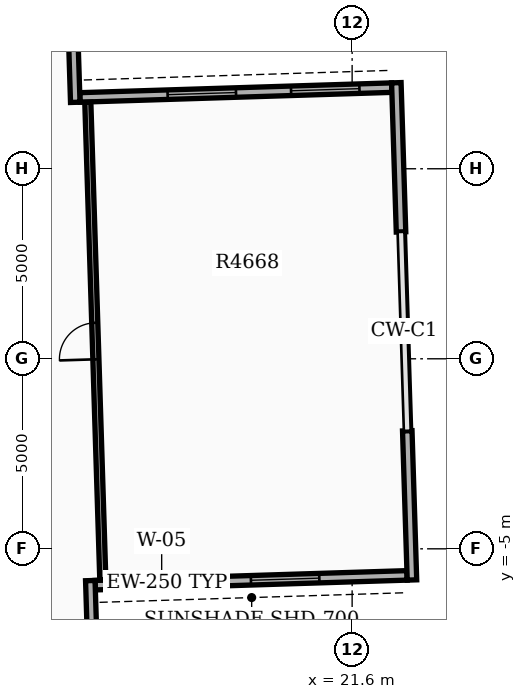
"""IFC4 building model, lengths in metres.
Left out: names, types, materials, properties, quantities, classifications, styles, units other than length and angle.
Written with IfcOpenShell. Run it as: python <this file> out.ifc"""

import sys

from ifc_helpers import new_model, si_unit, direction, frame, frame_2d, origin, place, context, subcontext, project, spatial, rectangle, extrude, element, fill, save


model = new_model("IFC4")
c1 = context("Model", 3, precision=1e-05, world=origin(), true_north=direction((0.0, 1.0)))
c2 = subcontext(c1, "Body", "Model", "MODEL_VIEW")
j1 = project(units=[si_unit("LENGTHUNIT", "METRE"), si_unit("PLANEANGLEUNIT", "RADIAN")], contexts=[c1])
p1 = place(None, origin())
s1 = spatial("IfcSite", under=j1, at=p1, CompositionType="ELEMENT")
p2 = place(p1, origin())
s2 = spatial("IfcBuilding", under=s1, at=p2, CompositionType="ELEMENT")
p3 = place(p2, frame((0.0, 0.0, 299.4)))
s3 = spatial("IfcBuildingStorey", under=s2, at=p3, CompositionType="ELEMENT", Elevation=299.4)
p4 = place(p3, frame((14.839, -5.957, 0.0), z_axis=(0.0, 0.0, 1.0), x_axis=(0.99950684008, 0.031401857168, 0.0)))
e1 = element("IfcWall", 1, at=p4, inside=s3, PredefinedType="STANDARD", context=c2, shape_type="SweptSolid", body=[
    extrude(rectangle(XDim=8.21, YDim=0.25, at=frame_2d((4.105, 0.0))), origin(), (0.0, 0.0, 1.0), 3.73),
])
p5 = place(p4, frame((0.85, 0.0, 0.8)))
e2 = element("IfcOpeningElement", 2, at=p5, cuts=e1, PredefinedType="OPENING", context=c2, shape_type="SweptSolid", body=[
    extrude(rectangle(XDim=1.8, YDim=1.8, at=frame_2d((0.9, 0.9))), frame((0.0, 0.135, 0.0), z_axis=(0.0, -1.0, 0.0), x_axis=(1.0, 0.0, 0.0)), (0.0, 0.0, 1.0), 0.27),
])
p6 = place(p4, frame((4.1, 0.0, 0.8)))
e3 = element("IfcOpeningElement", 3, at=p6, cuts=e1, PredefinedType="OPENING", context=c2, shape_type="SweptSolid", body=[
    extrude(rectangle(XDim=1.8, YDim=1.8, at=frame_2d((0.9, 0.9))), frame((0.0, 0.135, 0.0), z_axis=(0.0, -1.0, 0.0), x_axis=(1.0, 0.0, 0.0)), (0.0, 0.0, 1.0), 0.27),
])
p7 = place(p3, frame((22.642, 7.135, 0.0), z_axis=(0.0, 0.0, 1.0), x_axis=(-0.999505906315, -0.031431564411, 0.0)))
e4 = element("IfcWall", 4, at=p7, inside=s3, PredefinedType="STANDARD", context=c2, shape_type="SweptSolid", body=[
    extrude(rectangle(XDim=8.21, YDim=0.25, at=frame_2d((4.105, 0.0))), origin(), (0.0, 0.0, 1.0), 3.73),
])
p8 = place(p7, frame((0.85, 0.0, 0.8)))
e5 = element("IfcOpeningElement", 5, at=p8, cuts=e4, PredefinedType="OPENING", context=c2, shape_type="SweptSolid", body=[
    extrude(rectangle(XDim=1.8, YDim=1.8, at=frame_2d((0.9, 0.9))), frame((0.0, 0.135, 0.0), z_axis=(0.0, -1.0, 0.0), x_axis=(1.0, 0.0, 0.0)), (0.0, 0.0, 1.0), 0.27),
])
p9 = place(p7, frame((4.1, 0.0, 0.8)))
e6 = element("IfcOpeningElement", 6, at=p9, cuts=e4, PredefinedType="OPENING", context=c2, shape_type="SweptSolid", body=[
    extrude(rectangle(XDim=1.8, YDim=1.8, at=frame_2d((0.9, 0.9))), frame((0.0, 0.135, 0.0), z_axis=(0.0, -1.0, 0.0), x_axis=(1.0, 0.0, 0.0)), (0.0, 0.0, 1.0), 0.27),
])
p10 = place(p3, frame((23.174, -5.82, 0.0), z_axis=(0.0, 0.0, 1.0), x_axis=(-0.031457956613, 0.999505076008, 0.0)))
e7 = element("IfcWall", 7, at=p10, inside=s3, PredefinedType="STANDARD", context=c2, shape_type="SweptSolid", body=[
    extrude(rectangle(XDim=3.927, YDim=0.25, at=frame_2d((1.963, 0.0))), origin(), (0.0, 0.0, 1.0), 3.73),
])
p11 = place(p3, frame((22.886, 3.338, 0.0), z_axis=(0.0, 0.0, 1.0), x_axis=(-0.031393897283, 0.999507090127, 0.0)))
e8 = element("IfcWall", 8, at=p11, inside=s3, PredefinedType="STANDARD", context=c2, shape_type="SweptSolid", body=[
    extrude(rectangle(XDim=3.927, YDim=0.25, at=frame_2d((1.964, 0.0))), origin(), (0.0, 0.0, 1.0), 3.73),
])
p12 = place(p3, frame((14.315, 6.748, 0.0), z_axis=(0.0, 0.0, 1.0), x_axis=(-0.03143615455, 0.999505761958, 0.0)))
e9 = element("IfcWall", 9, at=p12, inside=s3, PredefinedType="STANDARD", context=c2, shape_type="SweptSolid", body=[
    extrude(rectangle(XDim=6.85, YDim=0.25, at=frame_2d((3.425, 0.0))), origin(), (0.0, 0.0, 1.0), 3.73),
])
p13 = place(p3, frame((14.711, -5.836, 0.0), z_axis=(0.0, 0.0, 1.0), x_axis=(0.031399429229, -0.999506916356, 0.0)))
e10 = element("IfcWall", 10, at=p13, inside=s3, PredefinedType="STANDARD", context=c2, shape_type="SweptSolid", body=[
    extrude(rectangle(XDim=6.85, YDim=0.25, at=frame_2d((3.425, 0.0))), origin(), (0.0, 0.0, 1.0), 3.73),
])
p14 = place(p3, frame((15.04, -5.817, 0.0), z_axis=(0.0, 0.0, 1.0), x_axis=(-0.031415998373, 0.999506395701, 0.0)))
e11 = element("IfcWall", 11, at=p14, inside=s3, PredefinedType="PARTITIONING", context=c2, shape_type="SweptSolid", body=[
    extrude(rectangle(XDim=12.574, YDim=0.16, at=frame_2d((6.287, 0.0))), origin(), (0.0, 0.0, 1.0), 3.72),
])
p15 = place(p14, frame((5.807, 0.0, 0.0)))
e12 = element("IfcOpeningElement", 12, at=p15, cuts=e11, PredefinedType="OPENING", context=c2, shape_type="SweptSolid", body=[
    extrude(rectangle(XDim=0.96, YDim=2.15, at=frame_2d((0.48, 1.075))), frame((0.0, 0.09, 0.0), z_axis=(0.0, -1.0, 0.0), x_axis=(1.0, 0.0, 0.0)), (0.0, 0.0, 1.0), 0.18),
])
p16 = place(p5, origin())
e13 = element("IfcWindow", 13, at=p16, inside=s3, PartitioningType="SINGLE_PANEL", PredefinedType="WINDOW", context=c2, shape_type="SweptSolid", body=[
    extrude(rectangle(XDim=1.8, YDim=1.8, at=frame_2d((0.9, 0.9))), frame((0.0, 0.03, 0.0), z_axis=(0.0, -1.0, 0.0), x_axis=(1.0, 0.0, 0.0)), (0.0, 0.0, 1.0), 0.06),
])
fill(e2, e13)
p17 = place(p6, origin())
e14 = element("IfcWindow", 14, at=p17, inside=s3, PartitioningType="SINGLE_PANEL", PredefinedType="WINDOW", context=c2, shape_type="SweptSolid", body=[
    extrude(rectangle(XDim=1.8, YDim=1.8, at=frame_2d((0.9, 0.9))), frame((0.0, 0.03, 0.0), z_axis=(0.0, -1.0, 0.0), x_axis=(1.0, 0.0, 0.0)), (0.0, 0.0, 1.0), 0.06),
])
fill(e3, e14)
p18 = place(p8, origin())
e15 = element("IfcWindow", 15, at=p18, inside=s3, PartitioningType="SINGLE_PANEL", PredefinedType="WINDOW", context=c2, shape_type="SweptSolid", body=[
    extrude(rectangle(XDim=1.8, YDim=1.8, at=frame_2d((0.9, 0.9))), frame((0.0, 0.03, 0.0), z_axis=(0.0, -1.0, 0.0), x_axis=(1.0, 0.0, 0.0)), (0.0, 0.0, 1.0), 0.06),
])
fill(e5, e15)
p19 = place(p9, origin())
e16 = element("IfcWindow", 16, at=p19, inside=s3, PartitioningType="SINGLE_PANEL", PredefinedType="WINDOW", context=c2, shape_type="SweptSolid", body=[
    extrude(rectangle(XDim=1.8, YDim=1.8, at=frame_2d((0.9, 0.9))), frame((0.0, 0.03, 0.0), z_axis=(0.0, -1.0, 0.0), x_axis=(1.0, 0.0, 0.0)), (0.0, 0.0, 1.0), 0.06),
])
fill(e6, e16)
p20 = place(p15, origin())
e17 = element("IfcDoor", 17, at=p20, inside=s3, OperationType="SINGLE_SWING_LEFT", PredefinedType="DOOR", context=c2, shape_type="SweptSolid", body=[
    extrude(rectangle(XDim=0.96, YDim=2.15, at=frame_2d((0.48, 1.075))), frame((0.0, 0.025, 0.0), z_axis=(0.0, -1.0, 0.0), x_axis=(1.0, 0.0, 0.0)), (0.0, 0.0, 1.0), 0.05),
])
fill(e12, e17)
save(model, sys.argv[1])
